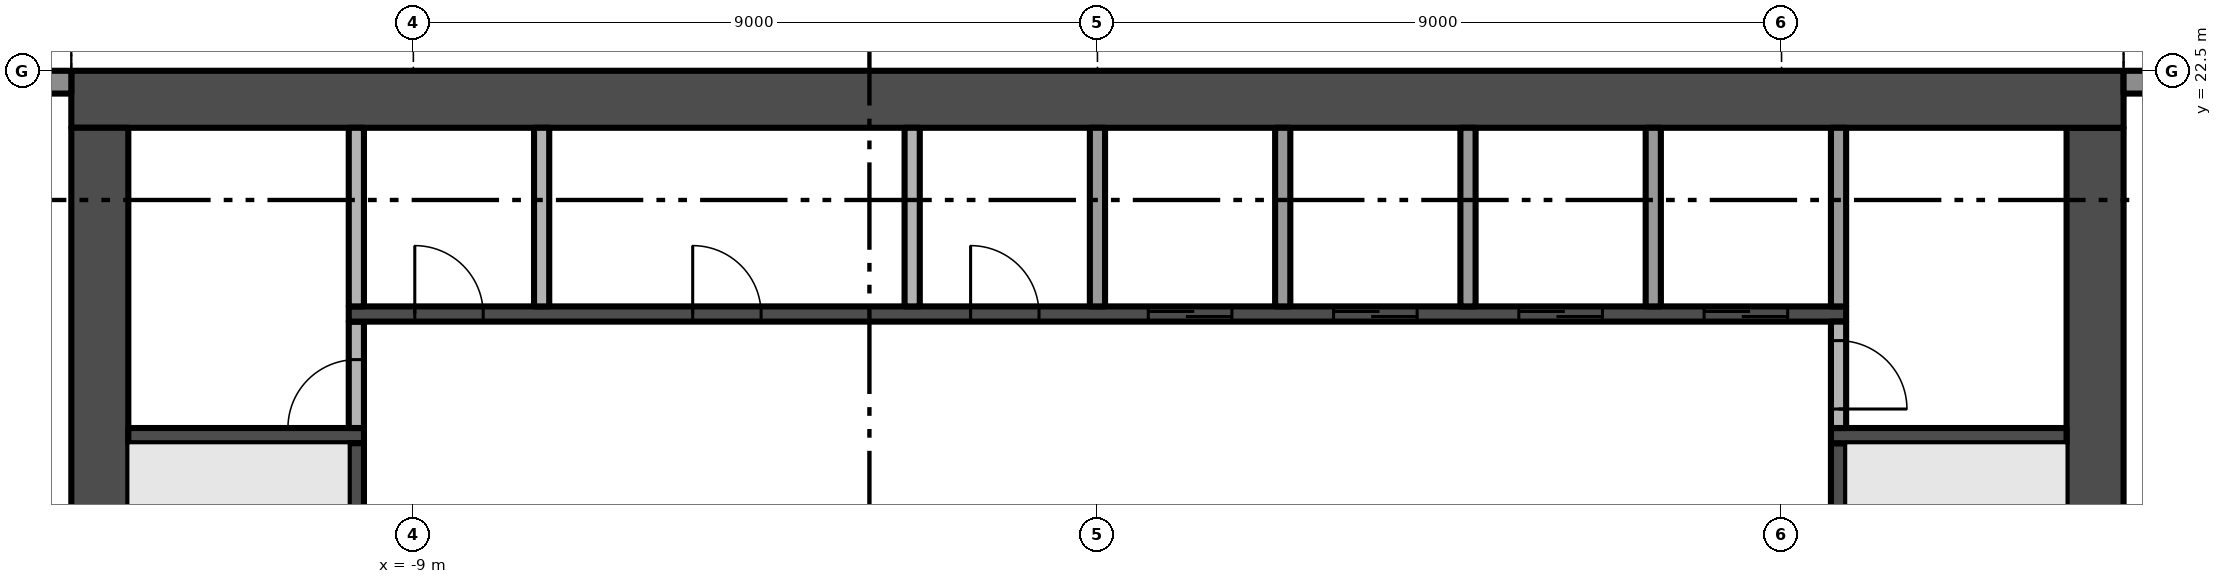
"""IFC4 building model, lengths in metres.
Left out: names, types, materials, properties, quantities, classifications, styles, units other than length and angle.
Written with IfcOpenShell. Run it as: python <this file> out.ifc"""

import sys

from ifc_helpers import new_model, si_unit, direction, frame, frame_2d, origin, place, context, subcontext, project, spatial, rectangle, extrude, element, fill, save


model = new_model("IFC4")
c1 = context("Model", 3, precision=1e-05, world=origin(), true_north=direction((0.0, 1.0)))
c2 = subcontext(c1, "Body", "Model", "MODEL_VIEW")
j1 = project(units=[si_unit("LENGTHUNIT", "METRE"), si_unit("PLANEANGLEUNIT", "RADIAN")], contexts=[c1])
p1 = place(None, origin())
s1 = spatial("IfcSite", under=j1, at=p1, CompositionType="ELEMENT")
p2 = place(p1, origin())
s2 = spatial("IfcBuilding", under=s1, at=p2, CompositionType="ELEMENT")
p3 = place(p2, frame((0.0, 0.0, 155.4)))
s3 = spatial("IfcBuildingStorey", under=s2, at=p3, CompositionType="ELEMENT", Elevation=155.4)
p4 = place(p3, frame((13.125, 5.25, -0.3), z_axis=(0.0, 0.0, 1.0), x_axis=(0.0, 1.0, 0.0)))
e1 = element("IfcWall", 1, at=p4, inside=s3, PredefinedType="SHEAR", context=c2, shape_type="SweptSolid", body=[
    extrude(rectangle(XDim=16.5, YDim=0.75, at=frame_2d((8.25, 0.0))), origin(), (0.0, 0.0, 1.0), 3.8),
])
p5 = place(p4, frame((6.15, 0.0, 0.3)))
e2 = element("IfcOpeningElement", 2, at=p5, cuts=e1, PredefinedType="OPENING", context=c2, shape_type="SweptSolid", body=[
    extrude(rectangle(XDim=1.2, YDim=2.2, at=frame_2d((0.6, 1.1))), frame((0.0, 0.385, 0.0), z_axis=(0.0, -1.0, 0.0), x_axis=(1.0, 0.0, 0.0)), (0.0, 0.0, 1.0), 0.77),
])
p6 = place(p3, frame((13.5, 22.125, -0.3), z_axis=(0.0, 0.0, 1.0), x_axis=(-1.0, 0.0, 0.0)))
e3 = element("IfcWall", 3, at=p6, inside=s3, PredefinedType="SHEAR", context=c2, shape_type="SweptSolid", body=[
    extrude(rectangle(XDim=27.0, YDim=0.75, at=frame_2d((13.5, 0.0))), origin(), (0.0, 0.0, 1.0), 3.8),
])
p7 = place(p3, frame((-13.125, 21.75, -0.3), z_axis=(0.0, 0.0, 1.0), x_axis=(0.0, -1.0, 0.0)))
e4 = element("IfcWall", 4, at=p7, inside=s3, PredefinedType="SHEAR", context=c2, shape_type="SweptSolid", body=[
    extrude(rectangle(XDim=16.5, YDim=0.75, at=frame_2d((8.25, 0.0))), origin(), (0.0, 0.0, 1.0), 3.8),
])
p8 = place(p7, frame((9.15, 0.0, 0.3)))
e5 = element("IfcOpeningElement", 5, at=p8, cuts=e4, PredefinedType="OPENING", context=c2, shape_type="SweptSolid", body=[
    extrude(rectangle(XDim=1.2, YDim=2.2, at=frame_2d((0.6, 1.1))), frame((0.0, 0.385, 0.0), z_axis=(0.0, -1.0, 0.0), x_axis=(1.0, 0.0, 0.0)), (0.0, 0.0, 1.0), 0.77),
])
p9 = place(p3, frame((13.5, 22.35, 0.0), z_axis=(0.0, 0.0, 1.0), x_axis=(1.0, 0.0, 0.0)))
e6 = element("IfcWall", 6, at=p9, inside=s3, PredefinedType="SOLIDWALL", context=c2, shape_type="SweptSolid", body=[
    extrude(rectangle(XDim=3.35, YDim=0.3, at=frame_2d((1.675, 0.0))), origin(), (0.0, 0.0, 1.0), 3.5),
])
p10 = place(p9, frame((1.25, 0.0, 0.0)))
e7 = element("IfcOpeningElement", 7, at=p10, cuts=e6, PredefinedType="OPENING", context=c2, shape_type="SweptSolid", body=[
    extrude(rectangle(XDim=1.8, YDim=2.4, at=frame_2d((0.9, 1.2))), frame((0.0, 0.16, 0.0), z_axis=(0.0, -1.0, 0.0), x_axis=(1.0, 0.0, 0.0)), (0.0, 0.0, 1.0), 0.32),
])
p11 = place(p3, frame((-16.85, 22.35, 0.0), z_axis=(0.0, 0.0, 1.0), x_axis=(1.0, 0.0, 0.0)))
e8 = element("IfcWall", 8, at=p11, inside=s3, PredefinedType="SOLIDWALL", context=c2, shape_type="SweptSolid", body=[
    extrude(rectangle(XDim=3.35, YDim=0.3, at=frame_2d((1.675, 0.0))), origin(), (0.0, 0.0, 1.0), 3.5),
])
p12 = place(p11, frame((0.85, 0.0, 0.0)))
e9 = element("IfcOpeningElement", 9, at=p12, cuts=e8, PredefinedType="OPENING", context=c2, shape_type="SweptSolid", body=[
    extrude(rectangle(XDim=1.8, YDim=2.4, at=frame_2d((0.9, 1.2))), frame((0.0, 0.16, 0.0), z_axis=(0.0, -1.0, 0.0), x_axis=(1.0, 0.0, 0.0)), (0.0, 0.0, 1.0), 0.32),
])
p13 = place(p3, frame((-12.75, 17.7, 0.0), z_axis=(0.0, 0.0, 1.0), x_axis=(1.0, 0.0, 0.0)))
e10 = element("IfcWall", 10, at=p13, inside=s3, PredefinedType="SHEAR", context=c2, shape_type="SweptSolid", body=[
    extrude(rectangle(XDim=3.1, YDim=0.2, at=frame_2d((1.55, 0.0))), origin(), (0.0, 0.0, 1.0), 3.5),
])
p14 = place(p3, frame((-9.75, 16.1, 0.0), z_axis=(0.0, 0.0, 1.0), x_axis=(0.0, 1.0, 0.0)))
e11 = element("IfcWall", 11, at=p14, inside=s3, PredefinedType="SHEAR", context=c2, shape_type="SweptSolid", body=[
    extrude(rectangle(XDim=1.5, YDim=0.2, at=frame_2d((0.75, 0.0))), origin(), (0.0, 0.0, 1.0), 3.5),
])
p15 = place(p3, frame((-9.75, 17.8, 0.0), z_axis=(0.0, 0.0, 1.0), x_axis=(0.0, 1.0, 0.0)))
e12 = element("IfcWall", 12, at=p15, inside=s3, PredefinedType="PARTITIONING", context=c2, shape_type="SweptSolid", body=[
    extrude(rectangle(XDim=1.4, YDim=0.2, at=frame_2d((0.7, 0.0))), origin(), (0.0, 0.0, 1.0), 3.5),
])
p16 = place(p15, origin())
e13 = element("IfcOpeningElement", 13, at=p16, cuts=e12, PredefinedType="OPENING", context=c2, shape_type="SweptSolid", body=[
    extrude(rectangle(XDim=0.9, YDim=2.1, at=frame_2d((0.45, 1.05))), frame((0.0, 0.11, 0.0), z_axis=(0.0, -1.0, 0.0), x_axis=(1.0, 0.0, 0.0)), (0.0, 0.0, 1.0), 0.22),
])
p17 = place(p3, frame((-9.85, 19.3, 0.0), z_axis=(0.0, 0.0, 1.0), x_axis=(1.0, 0.0, 0.0)))
e14 = element("IfcWall", 14, at=p17, inside=s3, PredefinedType="SHEAR", context=c2, shape_type="SweptSolid", body=[
    extrude(rectangle(XDim=19.7, YDim=0.2, at=frame_2d((9.85, 0.0))), origin(), (0.0, 0.0, 1.0), 3.5),
])
p18 = place(p17, frame((10.519, 0.0, 0.0)))
e15 = element("IfcOpeningElement", 15, at=p18, cuts=e14, PredefinedType="OPENING", context=c2, shape_type="SweptSolid", body=[
    extrude(rectangle(XDim=1.1, YDim=2.1, at=frame_2d((0.55, 1.05))), frame((0.0, 0.11, 0.0), z_axis=(0.0, -1.0, 0.0), x_axis=(1.0, 0.0, 0.0)), (0.0, 0.0, 1.0), 0.22),
])
p19 = place(p17, frame((12.956, 0.0, 0.0)))
e16 = element("IfcOpeningElement", 16, at=p19, cuts=e14, PredefinedType="OPENING", context=c2, shape_type="SweptSolid", body=[
    extrude(rectangle(XDim=1.1, YDim=2.1, at=frame_2d((0.55, 1.05))), frame((0.0, 0.11, 0.0), z_axis=(0.0, -1.0, 0.0), x_axis=(1.0, 0.0, 0.0)), (0.0, 0.0, 1.0), 0.22),
])
p20 = place(p17, frame((15.394, 0.0, 0.0)))
e17 = element("IfcOpeningElement", 17, at=p20, cuts=e14, PredefinedType="OPENING", context=c2, shape_type="SweptSolid", body=[
    extrude(rectangle(XDim=1.1, YDim=2.1, at=frame_2d((0.55, 1.05))), frame((0.0, 0.11, 0.0), z_axis=(0.0, -1.0, 0.0), x_axis=(1.0, 0.0, 0.0)), (0.0, 0.0, 1.0), 0.22),
])
p21 = place(p17, frame((17.831, 0.0, 0.0)))
e18 = element("IfcOpeningElement", 18, at=p21, cuts=e14, PredefinedType="OPENING", context=c2, shape_type="SweptSolid", body=[
    extrude(rectangle(XDim=1.1, YDim=2.1, at=frame_2d((0.55, 1.05))), frame((0.0, 0.11, 0.0), z_axis=(0.0, -1.0, 0.0), x_axis=(1.0, 0.0, 0.0)), (0.0, 0.0, 1.0), 0.22),
])
p22 = place(p17, frame((0.869, 0.0, 0.0)))
e19 = element("IfcOpeningElement", 19, at=p22, cuts=e14, PredefinedType="OPENING", context=c2, shape_type="SweptSolid", body=[
    extrude(rectangle(XDim=0.9, YDim=2.1, at=frame_2d((0.45, 1.05))), frame((0.0, 0.11, 0.0), z_axis=(0.0, -1.0, 0.0), x_axis=(1.0, 0.0, 0.0)), (0.0, 0.0, 1.0), 0.22),
])
p23 = place(p17, frame((4.525, 0.0, 0.0)))
e20 = element("IfcOpeningElement", 20, at=p23, cuts=e14, PredefinedType="OPENING", context=c2, shape_type="SweptSolid", body=[
    extrude(rectangle(XDim=0.9, YDim=2.1, at=frame_2d((0.45, 1.05))), frame((0.0, 0.11, 0.0), z_axis=(0.0, -1.0, 0.0), x_axis=(1.0, 0.0, 0.0)), (0.0, 0.0, 1.0), 0.22),
])
p24 = place(p17, frame((8.181, 0.0, 0.0)))
e21 = element("IfcOpeningElement", 21, at=p24, cuts=e14, PredefinedType="OPENING", context=c2, shape_type="SweptSolid", body=[
    extrude(rectangle(XDim=0.9, YDim=2.1, at=frame_2d((0.45, 1.05))), frame((0.0, 0.11, 0.0), z_axis=(0.0, -1.0, 0.0), x_axis=(1.0, 0.0, 0.0)), (0.0, 0.0, 1.0), 0.22),
])
for number, where, z_axis, x_axis in (
    (22, (-9.75, 19.4, 0.0), (0.0, 0.0, 1.0), (0.0, 1.0, 0.0)),
    (23, (-7.312, 19.4, 0.0), (0.0, 0.0, 1.0), (0.0, 1.0, 0.0)),
    (24, (-2.438, 19.4, 0.0), (0.0, 0.0, 1.0), (0.0, 1.0, 0.0)),
    (25, (0.0, 19.4, 0.0), (0.0, 0.0, 1.0), (0.0, 1.0, 0.0)),
    (26, (2.438, 19.4, 0.0), (0.0, 0.0, 1.0), (0.0, 1.0, 0.0)),
    (27, (4.875, 19.4, 0.0), (0.0, 0.0, 1.0), (0.0, 1.0, 0.0)),
    (28, (7.312, 19.4, 0.0), (0.0, 0.0, 1.0), (0.0, 1.0, 0.0)),
):
    element("IfcWall", number, at=place(p3, frame(where, z_axis=z_axis, x_axis=x_axis)), inside=s3, PredefinedType="PARTITIONING", context=c2, shape_type="SweptSolid", body=[
        extrude(rectangle(XDim=2.35, YDim=0.2, at=frame_2d((1.175, 0.0))), origin(), (0.0, 0.0, 1.0), 3.5),
    ])
p25 = place(p3, frame((9.75, 16.1, 0.0), z_axis=(0.0, 0.0, 1.0), x_axis=(0.0, 1.0, 0.0)))
e29 = element("IfcWall", 29, at=p25, inside=s3, PredefinedType="SHEAR", context=c2, shape_type="SweptSolid", body=[
    extrude(rectangle(XDim=1.5, YDim=0.2, at=frame_2d((0.75, 0.0))), origin(), (0.0, 0.0, 1.0), 3.5),
])
p26 = place(p3, frame((9.65, 17.7, 0.0), z_axis=(0.0, 0.0, 1.0), x_axis=(1.0, 0.0, 0.0)))
e30 = element("IfcWall", 30, at=p26, inside=s3, PredefinedType="SHEAR", context=c2, shape_type="SweptSolid", body=[
    extrude(rectangle(XDim=3.1, YDim=0.2, at=frame_2d((1.55, 0.0))), origin(), (0.0, 0.0, 1.0), 3.5),
])
p27 = place(p3, frame((9.75, 19.2, 0.0), z_axis=(0.0, 0.0, 1.0), x_axis=(0.0, -1.0, 0.0)))
e31 = element("IfcWall", 31, at=p27, inside=s3, PredefinedType="PARTITIONING", context=c2, shape_type="SweptSolid", body=[
    extrude(rectangle(XDim=1.4, YDim=0.2, at=frame_2d((0.7, 0.0))), origin(), (0.0, 0.0, 1.0), 3.5),
])
p28 = place(p27, frame((0.25, 0.0, 0.0)))
e32 = element("IfcOpeningElement", 32, at=p28, cuts=e31, PredefinedType="OPENING", context=c2, shape_type="SweptSolid", body=[
    extrude(rectangle(XDim=0.9, YDim=2.1, at=frame_2d((0.45, 1.05))), frame((0.0, 0.11, 0.0), z_axis=(0.0, -1.0, 0.0), x_axis=(1.0, 0.0, 0.0)), (0.0, 0.0, 1.0), 0.22),
])
p29 = place(p3, frame((9.75, 19.4, 0.0), z_axis=(0.0, 0.0, 1.0), x_axis=(0.0, 1.0, 0.0)))
e33 = element("IfcWall", 33, at=p29, inside=s3, PredefinedType="PARTITIONING", context=c2, shape_type="SweptSolid", body=[
    extrude(rectangle(XDim=2.35, YDim=0.2, at=frame_2d((1.175, 0.0))), origin(), (0.0, 0.0, 1.0), 3.5),
])
p30 = place(p18, origin())
e34 = element("IfcDoor", 34, at=p30, inside=s3, OperationType="SLIDING_TO_RIGHT", PredefinedType="DOOR", context=c2, shape_type="SweptSolid", body=[
    extrude(rectangle(XDim=1.1, YDim=2.1, at=frame_2d((0.55, 1.05))), frame((0.0, 0.025, 0.0), z_axis=(0.0, -1.0, 0.0), x_axis=(1.0, 0.0, 0.0)), (0.0, 0.0, 1.0), 0.05),
])
fill(e15, e34)
p31 = place(p19, origin())
e35 = element("IfcDoor", 35, at=p31, inside=s3, OperationType="SLIDING_TO_RIGHT", PredefinedType="DOOR", context=c2, shape_type="SweptSolid", body=[
    extrude(rectangle(XDim=1.1, YDim=2.1, at=frame_2d((0.55, 1.05))), frame((0.0, 0.025, 0.0), z_axis=(0.0, -1.0, 0.0), x_axis=(1.0, 0.0, 0.0)), (0.0, 0.0, 1.0), 0.05),
])
fill(e16, e35)
p32 = place(p20, origin())
e36 = element("IfcDoor", 36, at=p32, inside=s3, OperationType="SLIDING_TO_RIGHT", PredefinedType="DOOR", context=c2, shape_type="SweptSolid", body=[
    extrude(rectangle(XDim=1.1, YDim=2.1, at=frame_2d((0.55, 1.05))), frame((0.0, 0.025, 0.0), z_axis=(0.0, -1.0, 0.0), x_axis=(1.0, 0.0, 0.0)), (0.0, 0.0, 1.0), 0.05),
])
fill(e17, e36)
p33 = place(p21, origin())
e37 = element("IfcDoor", 37, at=p33, inside=s3, OperationType="SLIDING_TO_RIGHT", PredefinedType="DOOR", context=c2, shape_type="SweptSolid", body=[
    extrude(rectangle(XDim=1.1, YDim=2.1, at=frame_2d((0.55, 1.05))), frame((0.0, 0.025, 0.0), z_axis=(0.0, -1.0, 0.0), x_axis=(1.0, 0.0, 0.0)), (0.0, 0.0, 1.0), 0.05),
])
fill(e18, e37)
p34 = place(p16, origin())
e38 = element("IfcDoor", 38, at=p34, inside=s3, OperationType="SINGLE_SWING_LEFT", PredefinedType="DOOR", context=c2, shape_type="SweptSolid", body=[
    extrude(rectangle(XDim=0.9, YDim=2.1, at=frame_2d((0.45, 1.05))), frame((0.0, 0.025, 0.0), z_axis=(0.0, -1.0, 0.0), x_axis=(1.0, 0.0, 0.0)), (0.0, 0.0, 1.0), 0.05),
])
fill(e13, e38)
p35 = place(p28, origin())
e39 = element("IfcDoor", 39, at=p35, inside=s3, OperationType="SINGLE_SWING_RIGHT", PredefinedType="DOOR", context=c2, shape_type="SweptSolid", body=[
    extrude(rectangle(XDim=0.9, YDim=2.1, at=frame_2d((0.45, 1.05))), frame((0.0, 0.025, 0.0), z_axis=(0.0, -1.0, 0.0), x_axis=(1.0, 0.0, 0.0)), (0.0, 0.0, 1.0), 0.05),
])
fill(e32, e39)
p36 = place(p22, origin())
e40 = element("IfcDoor", 40, at=p36, inside=s3, OperationType="SINGLE_SWING_LEFT", PredefinedType="DOOR", context=c2, shape_type="SweptSolid", body=[
    extrude(rectangle(XDim=0.9, YDim=2.1, at=frame_2d((0.45, 1.05))), frame((0.0, 0.025, 0.0), z_axis=(0.0, -1.0, 0.0), x_axis=(1.0, 0.0, 0.0)), (0.0, 0.0, 1.0), 0.05),
])
fill(e19, e40)
p37 = place(p23, origin())
e41 = element("IfcDoor", 41, at=p37, inside=s3, OperationType="SINGLE_SWING_LEFT", PredefinedType="DOOR", context=c2, shape_type="SweptSolid", body=[
    extrude(rectangle(XDim=0.9, YDim=2.1, at=frame_2d((0.45, 1.05))), frame((0.0, 0.025, 0.0), z_axis=(0.0, -1.0, 0.0), x_axis=(1.0, 0.0, 0.0)), (0.0, 0.0, 1.0), 0.05),
])
fill(e20, e41)
p38 = place(p24, origin())
e42 = element("IfcDoor", 42, at=p38, inside=s3, OperationType="SINGLE_SWING_LEFT", PredefinedType="DOOR", context=c2, shape_type="SweptSolid", body=[
    extrude(rectangle(XDim=0.9, YDim=2.1, at=frame_2d((0.45, 1.05))), frame((0.0, 0.025, 0.0), z_axis=(0.0, -1.0, 0.0), x_axis=(1.0, 0.0, 0.0)), (0.0, 0.0, 1.0), 0.05),
])
fill(e21, e42)
save(model, sys.argv[1])
